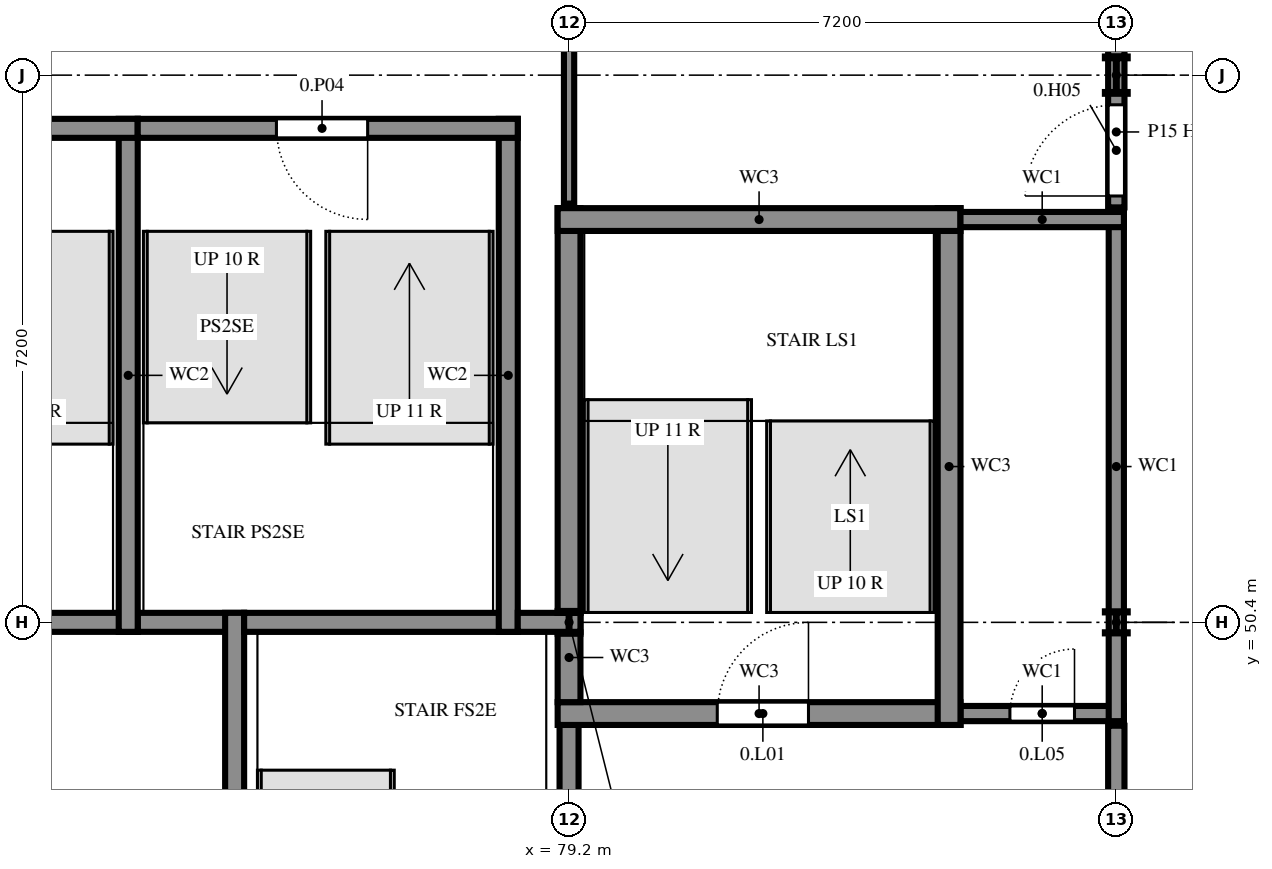
"""IFC4 building model, lengths in metres.
Left out: names, types, materials, properties, quantities, classifications, styles, units other than length and angle.
Written with IfcOpenShell. Run it as: python <this file> out.ifc"""

import sys

from ifc_helpers import new_model, si_unit, direction, frame, frame_2d, origin, origin_2d, place, context, subcontext, project, spatial, rectangle, i_section, extrude, element, fill, save


model = new_model("IFC4")
c1 = context("Model", 3, precision=1e-05, world=origin(), true_north=direction((0.0, 1.0)))
c2 = subcontext(c1, "Body", "Model", "MODEL_VIEW")
j1 = project(units=[si_unit("LENGTHUNIT", "METRE"), si_unit("PLANEANGLEUNIT", "RADIAN")], contexts=[c1])
p1 = place(None, origin())
s1 = spatial("IfcSite", under=j1, at=p1, CompositionType="ELEMENT")
p2 = place(p1, origin())
s2 = spatial("IfcBuilding", under=s1, at=p2, CompositionType="ELEMENT")
p3 = place(p2, origin())
s3 = spatial("IfcBuildingStorey", under=s2, at=p3, CompositionType="ELEMENT", Elevation=0.0)
p4 = place(p3, frame((79.2, 50.4, -0.3), z_axis=(0.0, 0.0, 1.0), x_axis=(1.0, 0.0, 0.0)))
e1 = element("IfcColumn", 1, at=p4, inside=s3, PredefinedType="COLUMN", context=c2, shape_type="SweptSolid", body=[
    extrude(i_section(OverallWidth=0.3, OverallDepth=0.3, WebThickness=0.011, FlangeThickness=0.019, FilletRadius=0.027, at=origin_2d()), origin(), (0.0, 0.0, 1.0), 3.9),
])
p5 = place(p3, frame((86.4, 50.4, -0.3), z_axis=(0.0, 0.0, 1.0), x_axis=(1.0, 0.0, 0.0)))
e2 = element("IfcColumn", 2, at=p5, inside=s3, PredefinedType="COLUMN", context=c2, shape_type="SweptSolid", body=[
    extrude(i_section(OverallWidth=0.3, OverallDepth=0.29, WebThickness=0.009, FlangeThickness=0.014, FilletRadius=0.027, at=origin_2d()), origin(), (0.0, 0.0, 1.0), 3.9),
])
p6 = place(p3, frame((86.4, 57.6, -0.3), z_axis=(0.0, 0.0, 1.0), x_axis=(1.0, 0.0, 0.0)))
e3 = element("IfcColumn", 3, at=p6, inside=s3, PredefinedType="COLUMN", context=c2, shape_type="SweptSolid", body=[
    extrude(i_section(OverallWidth=0.3, OverallDepth=0.49, WebThickness=0.012, FlangeThickness=0.023, FilletRadius=0.027, at=origin_2d()), origin(), (0.0, 0.0, 1.0), 3.9),
])
p7 = place(p3, frame((79.2, 44.275, 0.0), z_axis=(0.0, 0.0, 1.0), x_axis=(0.0, 1.0, 0.0)))
e4 = element("IfcWall", 4, at=p7, inside=s3, PredefinedType="SHEAR", context=c2, shape_type="SweptSolid", body=[
    extrude(rectangle(XDim=5.075, YDim=0.25, at=frame_2d((2.538, 0.0))), origin(), (0.0, 0.0, 1.0), 3.6),
])
p8 = place(p3, frame((79.05, 49.2, 0.0), z_axis=(0.0, 0.0, 1.0), x_axis=(1.0, 0.0, 0.0)))
e5 = element("IfcWall", 5, at=p8, inside=s3, PredefinedType="SHEAR", context=c2, shape_type="SweptSolid", body=[
    extrude(rectangle(XDim=5.3, YDim=0.3, at=frame_2d((2.65, 0.0))), origin(), (0.0, 0.0, 1.0), 3.6),
])
p9 = place(p8, frame((2.1, 0.0, 0.0)))
e6 = element("IfcOpeningElement", 6, at=p9, cuts=e5, PredefinedType="OPENING", context=c2, shape_type="SweptSolid", body=[
    extrude(rectangle(XDim=1.2, YDim=2.4, at=frame_2d((0.6, 1.2))), frame((0.0, 0.16, 0.0), z_axis=(0.0, -1.0, 0.0), x_axis=(1.0, 0.0, 0.0)), (0.0, 0.0, 1.0), 0.32),
])
p10 = place(p3, frame((79.2, 49.35, 0.0), z_axis=(0.0, 0.0, 1.0), x_axis=(0.0, 1.0, 0.0)))
e7 = element("IfcWall", 7, at=p10, inside=s3, PredefinedType="SHEAR", context=c2, shape_type="SweptSolid", body=[
    extrude(rectangle(XDim=1.175, YDim=0.3, at=frame_2d((0.587, 0.0))), origin(), (0.0, 0.0, 1.0), 3.6),
])
p11 = place(p3, frame((84.35, 49.2, 0.0), z_axis=(0.0, 0.0, 1.0), x_axis=(1.0, 0.0, 0.0)))
e8 = element("IfcWall", 8, at=p11, inside=s3, PredefinedType="SHEAR", context=c2, shape_type="SweptSolid", body=[
    extrude(rectangle(XDim=2.15, YDim=0.2, at=frame_2d((1.075, 0.0))), origin(), (0.0, 0.0, 1.0), 3.6),
])
p12 = place(p11, frame((0.65, 0.0, 0.0)))
e9 = element("IfcOpeningElement", 9, at=p12, cuts=e8, PredefinedType="OPENING", context=c2, shape_type="SweptSolid", body=[
    extrude(rectangle(XDim=0.85, YDim=2.1, at=frame_2d((0.425, 1.05))), frame((0.0, 0.11, 0.0), z_axis=(0.0, -1.0, 0.0), x_axis=(1.0, 0.0, 0.0)), (0.0, 0.0, 1.0), 0.22),
])
p13 = place(p3, frame((84.2, 49.05, 0.0), z_axis=(0.0, 0.0, 1.0), x_axis=(0.0, 1.0, 0.0)))
e10 = element("IfcWall", 10, at=p13, inside=s3, PredefinedType="SHEAR", context=c2, shape_type="SweptSolid", body=[
    extrude(rectangle(XDim=6.8, YDim=0.3, at=frame_2d((3.4, 0.0))), origin(), (0.0, 0.0, 1.0), 3.6),
])
p14 = place(p3, frame((86.4, 49.1, 0.0), z_axis=(0.0, 0.0, 1.0), x_axis=(0.0, 1.0, 0.0)))
e11 = element("IfcWall", 11, at=p14, inside=s3, PredefinedType="SHEAR", context=c2, shape_type="SweptSolid", body=[
    extrude(rectangle(XDim=6.7, YDim=0.2, at=frame_2d((3.35, 0.0))), origin(), (0.0, 0.0, 1.0), 3.6),
])
p15 = place(p3, frame((68.275, 50.4, 0.0), z_axis=(0.0, 0.0, 1.0), x_axis=(1.0, 0.0, 0.0)))
e12 = element("IfcWall", 12, at=p15, inside=s3, PredefinedType="SHEAR", context=c2, shape_type="SweptSolid", body=[
    extrude(rectangle(XDim=5.25, YDim=0.25, at=frame_2d((2.625, 0.0))), origin(), (0.0, 0.0, 1.0), 3.6),
])
p16 = place(p3, frame((73.525, 50.4, 0.0), z_axis=(0.0, 0.0, 1.0), x_axis=(1.0, 0.0, 0.0)))
e13 = element("IfcWall", 13, at=p16, inside=s3, PredefinedType="SHEAR", context=c2, shape_type="SweptSolid", body=[
    extrude(rectangle(XDim=1.4, YDim=0.25, at=frame_2d((0.7, 0.0))), origin(), (0.0, 0.0, 1.0), 3.6),
])
p17 = place(p3, frame((73.4, 50.275, 0.0), z_axis=(0.0, 0.0, 1.0), x_axis=(0.0, 1.0, 0.0)))
e14 = element("IfcWall", 14, at=p17, inside=s3, PredefinedType="SHEAR", context=c2, shape_type="SweptSolid", body=[
    extrude(rectangle(XDim=6.75, YDim=0.25, at=frame_2d((3.375, 0.0))), origin(), (0.0, 0.0, 1.0), 3.6),
])
p18 = place(p3, frame((74.8, 50.525, 0.0), z_axis=(0.0, 0.0, 1.0), x_axis=(0.0, -1.0, 0.0)))
e15 = element("IfcWall", 15, at=p18, inside=s3, PredefinedType="SHEAR", context=c2, shape_type="SweptSolid", body=[
    extrude(rectangle(XDim=6.25, YDim=0.25, at=frame_2d((3.125, 0.0))), origin(), (0.0, 0.0, 1.0), 3.6),
])
p19 = place(p18, frame((4.875, 0.0, 0.0)))
e16 = element("IfcOpeningElement", 16, at=p19, cuts=e15, PredefinedType="OPENING", context=c2, shape_type="SweptSolid", body=[
    extrude(rectangle(XDim=1.0, YDim=2.4, at=frame_2d((0.5, 1.2))), frame((0.0, 0.135, 0.0), z_axis=(0.0, -1.0, 0.0), x_axis=(1.0, 0.0, 0.0)), (0.0, 0.0, 1.0), 0.27),
])
p20 = place(p3, frame((78.525, 50.4, 0.0), z_axis=(0.0, 0.0, 1.0), x_axis=(-1.0, 0.0, 0.0)))
e17 = element("IfcWall", 17, at=p20, inside=s3, PredefinedType="SHEAR", context=c2, shape_type="SweptSolid", body=[
    extrude(rectangle(XDim=3.6, YDim=0.25, at=frame_2d((1.8, 0.0))), origin(), (0.0, 0.0, 1.0), 3.6),
])
p21 = place(p3, frame((78.4, 50.275, 0.0), z_axis=(0.0, 0.0, 1.0), x_axis=(0.0, 1.0, 0.0)))
e18 = element("IfcWall", 18, at=p21, inside=s3, PredefinedType="SHEAR", context=c2, shape_type="SweptSolid", body=[
    extrude(rectangle(XDim=6.75, YDim=0.25, at=frame_2d((3.375, 0.0))), origin(), (0.0, 0.0, 1.0), 3.6),
])
p22 = place(p3, frame((79.35, 50.4, 0.0), z_axis=(0.0, 0.0, 1.0), x_axis=(-1.0, 0.0, 0.0)))
e19 = element("IfcWall", 19, at=p22, inside=s3, PredefinedType="SHEAR", context=c2, shape_type="SweptSolid", body=[
    extrude(rectangle(XDim=0.825, YDim=0.25, at=frame_2d((0.413, 0.0))), origin(), (0.0, 0.0, 1.0), 3.6),
])
p23 = place(p3, frame((79.2, 55.85, 0.0), z_axis=(0.0, 0.0, 1.0), x_axis=(0.0, -1.0, 0.0)))
e20 = element("IfcWall", 20, at=p23, inside=s3, PredefinedType="SHEAR", context=c2, shape_type="SweptSolid", body=[
    extrude(rectangle(XDim=5.325, YDim=0.3, at=frame_2d((2.663, 0.0))), origin(), (0.0, 0.0, 1.0), 3.6),
])
p24 = place(p3, frame((84.35, 55.7, 0.0), z_axis=(0.0, 0.0, 1.0), x_axis=(-1.0, 0.0, 0.0)))
e21 = element("IfcWall", 21, at=p24, inside=s3, PredefinedType="SHEAR", context=c2, shape_type="SweptSolid", body=[
    extrude(rectangle(XDim=5.3, YDim=0.3, at=frame_2d((2.65, 0.0))), origin(), (0.0, 0.0, 1.0), 3.6),
])
p25 = place(p3, frame((86.5, 55.7, 0.0), z_axis=(0.0, 0.0, 1.0), x_axis=(-1.0, 0.0, 0.0)))
e22 = element("IfcWall", 22, at=p25, inside=s3, PredefinedType="SHEAR", context=c2, shape_type="SweptSolid", body=[
    extrude(rectangle(XDim=2.15, YDim=0.2, at=frame_2d((1.075, 0.0))), origin(), (0.0, 0.0, 1.0), 3.6),
])
p26 = place(p3, frame((73.525, 56.9, 0.0), z_axis=(0.0, 0.0, 1.0), x_axis=(-1.0, 0.0, 0.0)))
e23 = element("IfcWall", 23, at=p26, inside=s3, PredefinedType="SHEAR", context=c2, shape_type="SweptSolid", body=[
    extrude(rectangle(XDim=5.25, YDim=0.25, at=frame_2d((2.625, 0.0))), origin(), (0.0, 0.0, 1.0), 3.6),
])
p27 = place(p26, frame((2.575, 0.0, 0.0)))
e24 = element("IfcOpeningElement", 24, at=p27, cuts=e23, PredefinedType="OPENING", context=c2, shape_type="SweptSolid", body=[
    extrude(rectangle(XDim=1.2, YDim=2.4, at=frame_2d((0.6, 1.2))), frame((0.0, 0.135, 0.0), z_axis=(0.0, -1.0, 0.0), x_axis=(1.0, 0.0, 0.0)), (0.0, 0.0, 1.0), 0.27),
])
p28 = place(p3, frame((78.525, 56.9, 0.0), z_axis=(0.0, 0.0, 1.0), x_axis=(-1.0, 0.0, 0.0)))
e25 = element("IfcWall", 25, at=p28, inside=s3, PredefinedType="SHEAR", context=c2, shape_type="SweptSolid", body=[
    extrude(rectangle(XDim=5.0, YDim=0.25, at=frame_2d((2.5, 0.0))), origin(), (0.0, 0.0, 1.0), 3.6),
])
p29 = place(p28, frame((1.975, 0.0, 0.0)))
e26 = element("IfcOpeningElement", 26, at=p29, cuts=e25, PredefinedType="OPENING", context=c2, shape_type="SweptSolid", body=[
    extrude(rectangle(XDim=1.2, YDim=2.4, at=frame_2d((0.6, 1.2))), frame((0.0, 0.135, 0.0), z_axis=(0.0, -1.0, 0.0), x_axis=(1.0, 0.0, 0.0)), (0.0, 0.0, 1.0), 0.27),
])
p30 = place(p3, frame((79.2, 61.2, 0.0), z_axis=(0.0, 0.0, 1.0), x_axis=(0.0, -1.0, 0.0)))
e27 = element("IfcWall", 27, at=p30, inside=s3, PredefinedType="PARTITIONING", context=c2, shape_type="SweptSolid", body=[
    extrude(rectangle(XDim=5.29, YDim=0.135, at=frame_2d((2.645, 0.0))), origin(), (0.0, 0.0, 1.0), 3.01),
])
p31 = place(p30, frame((1.35, 0.0, 0.0)))
e28 = element("IfcOpeningElement", 28, at=p31, cuts=e27, PredefinedType="OPENING", context=c2, shape_type="SweptSolid", body=[
    extrude(rectangle(XDim=1.8, YDim=2.4, at=frame_2d((0.9, 1.2))), frame((0.0, 0.077, 0.0), z_axis=(0.0, -1.0, 0.0), x_axis=(1.0, 0.0, 0.0)), (0.0, 0.0, 1.0), 0.155),
])
p32 = place(p3, frame((86.4, 43.48, 0.0), z_axis=(0.0, 0.0, 1.0), x_axis=(0.0, 1.0, 0.0)))
e29 = element("IfcWall", 29, at=p32, inside=s3, PredefinedType="PARTITIONING", context=c2, shape_type="SweptSolid", body=[
    extrude(rectangle(XDim=5.56, YDim=0.215, at=frame_2d((2.78, 0.0))), origin(), (0.0, 0.0, 1.0), 3.15),
])
p33 = place(p3, frame((86.4, 55.86, 0.0), z_axis=(0.0, 0.0, 1.0), x_axis=(0.0, 1.0, 0.0)))
e30 = element("IfcWall", 30, at=p33, inside=s3, PredefinedType="PARTITIONING", context=c2, shape_type="SweptSolid", body=[
    extrude(rectangle(XDim=1.985, YDim=0.215, at=frame_2d((0.992, 0.0))), origin(), (0.0, 0.0, 1.0), 3.6),
])
p34 = place(p33, frame((0.15, 0.0, 0.0)))
e31 = element("IfcOpeningElement", 31, at=p34, cuts=e30, PredefinedType="OPENING", context=c2, shape_type="SweptSolid", body=[
    extrude(rectangle(XDim=1.2, YDim=2.4, at=frame_2d((0.6, 1.2))), frame((0.0, 0.117, 0.0), z_axis=(0.0, -1.0, 0.0), x_axis=(1.0, 0.0, 0.0)), (0.0, 0.0, 1.0), 0.235),
])
p35 = place(p3, frame((86.4, 57.845, 0.0), z_axis=(0.0, 0.0, 1.0), x_axis=(0.0, 1.0, 0.0)))
e32 = element("IfcWall", 32, at=p35, inside=s3, PredefinedType="PARTITIONING", context=c2, shape_type="SweptSolid", body=[
    extrude(rectangle(XDim=6.71, YDim=0.215, at=frame_2d((3.355, 0.0))), origin(), (0.0, 0.0, 1.0), 3.12),
])
p36 = place(p35, frame((4.965, 0.0, 0.0)))
e33 = element("IfcOpeningElement", 33, at=p36, cuts=e32, PredefinedType="OPENING", context=c2, shape_type="SweptSolid", body=[
    extrude(rectangle(XDim=1.5, YDim=2.1, at=frame_2d((0.75, 1.05))), frame((0.0, 0.117, 0.0), z_axis=(0.0, -1.0, 0.0), x_axis=(1.0, 0.0, 0.0)), (0.0, 0.0, 1.0), 0.235),
])
p37 = place(p29, origin())
e34 = element("IfcDoor", 34, at=p37, inside=s3, OperationType="SINGLE_SWING_RIGHT", PredefinedType="DOOR", context=c2, shape_type="SweptSolid", body=[
    extrude(rectangle(XDim=1.2, YDim=2.4, at=frame_2d((0.6, 1.2))), frame((0.0, 0.025, 0.0), z_axis=(0.0, -1.0, 0.0), x_axis=(1.0, 0.0, 0.0)), (0.0, 0.0, 1.0), 0.05),
])
fill(e26, e34)
p38 = place(p9, origin())
e35 = element("IfcDoor", 35, at=p38, inside=s3, OperationType="SINGLE_SWING_LEFT", PredefinedType="DOOR", context=c2, shape_type="SweptSolid", body=[
    extrude(rectangle(XDim=1.2, YDim=2.4, at=frame_2d((0.6, 1.2))), frame((0.0, 0.025, 0.0), z_axis=(0.0, -1.0, 0.0), x_axis=(1.0, 0.0, 0.0)), (0.0, 0.0, 1.0), 0.05),
])
fill(e6, e35)
p39 = place(p12, origin())
e36 = element("IfcDoor", 36, at=p39, inside=s3, OperationType="SINGLE_SWING_LEFT", PredefinedType="DOOR", context=c2, shape_type="SweptSolid", body=[
    extrude(rectangle(XDim=0.85, YDim=2.1, at=frame_2d((0.425, 1.05))), frame((0.0, 0.025, 0.0), z_axis=(0.0, -1.0, 0.0), x_axis=(1.0, 0.0, 0.0)), (0.0, 0.0, 1.0), 0.05),
])
fill(e9, e36)
p40 = place(p34, origin())
e37 = element("IfcDoor", 37, at=p40, inside=s3, OperationType="SINGLE_SWING_RIGHT", PredefinedType="DOOR", context=c2, shape_type="SweptSolid", body=[
    extrude(rectangle(XDim=1.2, YDim=2.4, at=frame_2d((0.6, 1.2))), frame((0.0, 0.025, 0.0), z_axis=(0.0, -1.0, 0.0), x_axis=(1.0, 0.0, 0.0)), (0.0, 0.0, 1.0), 0.05),
])
fill(e31, e37)
save(model, sys.argv[1])
